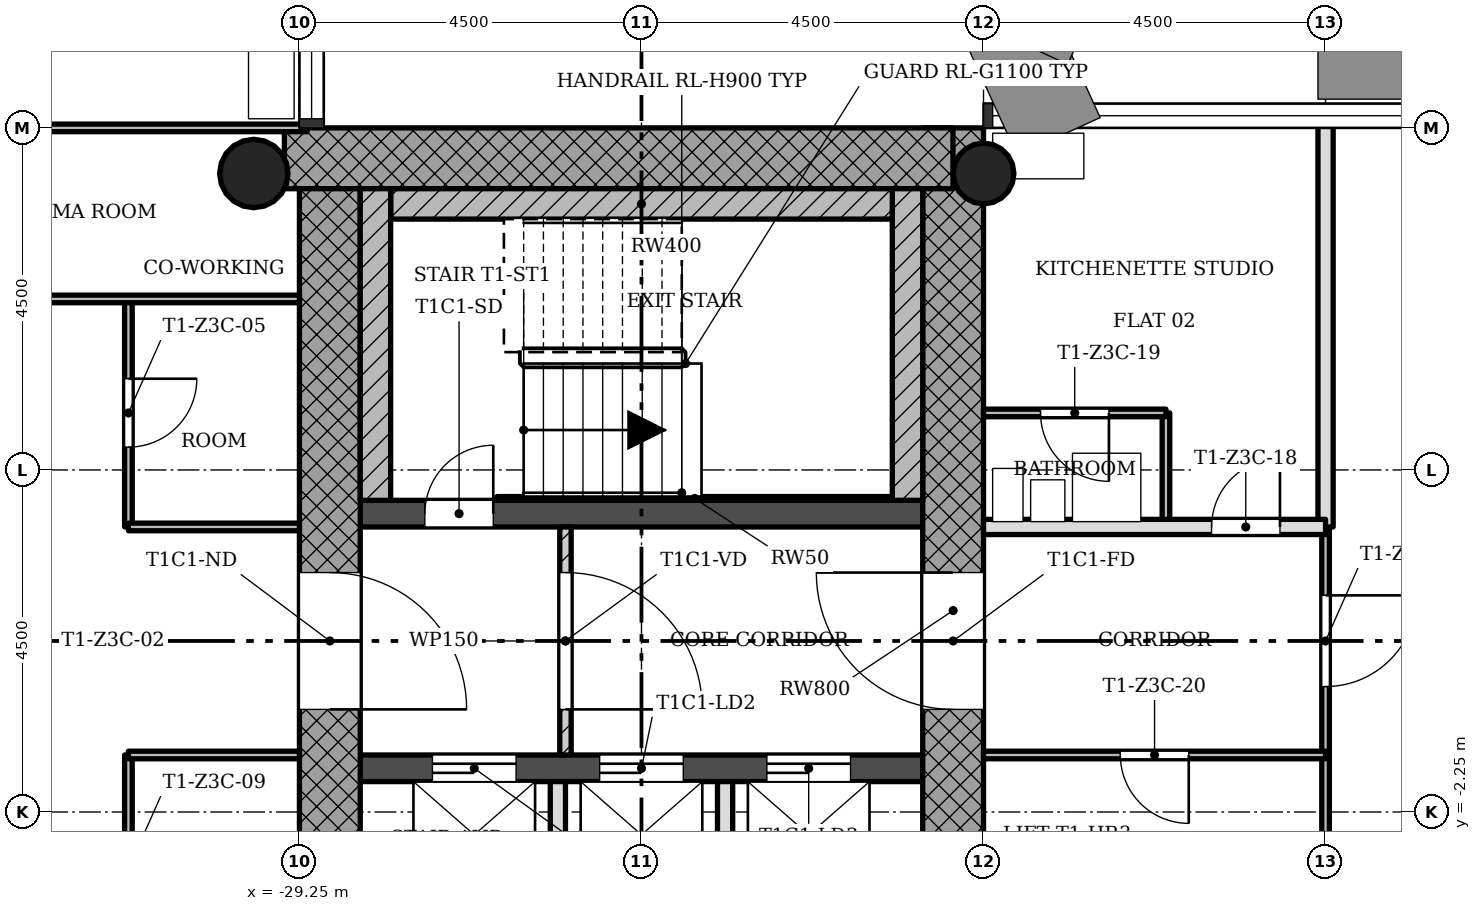
"""IFC4 building model, lengths in metres.
Left out: names, types, materials, properties, quantities, classifications, styles, units other than length and angle.
Written with IfcOpenShell. Run it as: python <this file> out.ifc"""

import sys

from ifc_helpers import new_model, si_unit, direction, frame, frame_2d, origin, origin_2d, place, context, subcontext, project, spatial, rectangle, hollow_circle, extrude, element, fill, save


model = new_model("IFC4")
c1 = context("Model", 3, precision=1e-05, world=origin(), true_north=direction((0.0, 1.0)))
c2 = subcontext(c1, "Body", "Model", "MODEL_VIEW")
j1 = project(units=[si_unit("LENGTHUNIT", "METRE"), si_unit("PLANEANGLEUNIT", "RADIAN")], contexts=[c1])
p1 = place(None, origin())
s1 = spatial("IfcSite", under=j1, at=p1, CompositionType="ELEMENT")
p2 = place(p1, origin())
s2 = spatial("IfcBuilding", under=s1, at=p2, CompositionType="ELEMENT")
p3 = place(p2, frame((0.0, 0.0, 157.5)))
s3 = spatial("IfcBuildingStorey", under=s2, at=p3, CompositionType="ELEMENT", Elevation=157.5)
p4 = place(p3, frame((-20.65, -5.95, 0.0), z_axis=(0.0, 0.0, 1.0), x_axis=(0.0, 1.0, 0.0)))
e1 = element("IfcWall", 1, at=p4, inside=s3, PredefinedType="SHEAR", context=c2, shape_type="SweptSolid", body=[
    extrude(rectangle(XDim=12.7, YDim=0.8, at=frame_2d((6.35, 0.0))), origin(), (0.0, 0.0, 1.0), 3.4),
])
p5 = place(p4, frame((5.05, 0.0, 0.0)))
e2 = element("IfcOpeningElement", 2, at=p5, cuts=e1, PredefinedType="OPENING", context=c2, shape_type="SweptSolid", body=[
    extrude(rectangle(XDim=1.8, YDim=2.1, at=frame_2d((0.9, 1.05))), frame((0.0, 0.41, 0.0), z_axis=(0.0, -1.0, 0.0), x_axis=(1.0, 0.0, 0.0)), (0.0, 0.0, 1.0), 0.82),
])
p6 = place(p3, frame((-20.652, 6.35, 0.0), z_axis=(0.0, 0.0, 1.0), x_axis=(-1.0, 0.0, 0.0)))
e3 = element("IfcWall", 3, at=p6, inside=s3, PredefinedType="SHEAR", context=c2, shape_type="SweptSolid", body=[
    extrude(rectangle(XDim=8.796, YDim=0.8, at=frame_2d((4.398, 0.0))), origin(), (0.0, 0.0, 1.0), 3.4),
])
p7 = place(p3, frame((-28.85, 5.95, 0.0), z_axis=(0.0, 0.0, 1.0), x_axis=(0.0, -1.0, 0.0)))
e4 = element("IfcWall", 4, at=p7, inside=s3, PredefinedType="SHEAR", context=c2, shape_type="SweptSolid", body=[
    extrude(rectangle(XDim=12.7, YDim=0.8, at=frame_2d((6.35, 0.0))), origin(), (0.0, 0.0, 1.0), 3.4),
])
p8 = place(p7, frame((5.05, 0.0, 0.0)))
e5 = element("IfcOpeningElement", 5, at=p8, cuts=e4, PredefinedType="OPENING", context=c2, shape_type="SweptSolid", body=[
    extrude(rectangle(XDim=1.8, YDim=2.1, at=frame_2d((0.9, 1.05))), frame((0.0, 0.41, 0.0), z_axis=(0.0, -1.0, 0.0), x_axis=(1.0, 0.0, 0.0)), (0.0, 0.0, 1.0), 0.82),
])
p9 = place(p3, frame((-28.45, -1.675, 0.0), z_axis=(0.0, 0.0, 1.0), x_axis=(1.0, 0.0, 0.0)))
e6 = element("IfcWall", 6, at=p9, inside=s3, PredefinedType="SHEAR", context=c2, shape_type="SweptSolid", body=[
    extrude(rectangle(XDim=7.4, YDim=0.35, at=frame_2d((3.7, 0.0))), origin(), (0.0, 0.0, 1.0), 3.4),
])
p10 = place(p9, frame((0.95, 0.0, 0.0)))
e7 = element("IfcOpeningElement", 7, at=p10, cuts=e6, PredefinedType="OPENING", context=c2, shape_type="SweptSolid", body=[
    extrude(rectangle(XDim=1.1, YDim=2.1, at=frame_2d((0.55, 1.05))), frame((0.0, 0.185, 0.0), z_axis=(0.0, -1.0, 0.0), x_axis=(1.0, 0.0, 0.0)), (0.0, 0.0, 1.0), 0.37),
])
p11 = place(p9, frame((3.15, 0.0, 0.0)))
e8 = element("IfcOpeningElement", 8, at=p11, cuts=e6, PredefinedType="OPENING", context=c2, shape_type="SweptSolid", body=[
    extrude(rectangle(XDim=1.1, YDim=2.1, at=frame_2d((0.55, 1.05))), frame((0.0, 0.185, 0.0), z_axis=(0.0, -1.0, 0.0), x_axis=(1.0, 0.0, 0.0)), (0.0, 0.0, 1.0), 0.37),
])
p12 = place(p9, frame((5.35, 0.0, 0.0)))
e9 = element("IfcOpeningElement", 9, at=p12, cuts=e6, PredefinedType="OPENING", context=c2, shape_type="SweptSolid", body=[
    extrude(rectangle(XDim=1.1, YDim=2.1, at=frame_2d((0.55, 1.05))), frame((0.0, 0.185, 0.0), z_axis=(0.0, -1.0, 0.0), x_axis=(1.0, 0.0, 0.0)), (0.0, 0.0, 1.0), 0.37),
])
p13 = place(p3, frame((-28.45, 1.675, 0.0), z_axis=(0.0, 0.0, 1.0), x_axis=(1.0, 0.0, 0.0)))
e10 = element("IfcWall", 10, at=p13, inside=s3, PredefinedType="SHEAR", context=c2, shape_type="SweptSolid", body=[
    extrude(rectangle(XDim=7.4, YDim=0.35, at=frame_2d((3.7, 0.0))), origin(), (0.0, 0.0, 1.0), 3.4),
])
p14 = place(p13, frame((0.85, 0.0, 0.0)))
e11 = element("IfcOpeningElement", 11, at=p14, cuts=e10, PredefinedType="OPENING", context=c2, shape_type="SweptSolid", body=[
    extrude(rectangle(XDim=0.9, YDim=2.1, at=frame_2d((0.45, 1.05))), frame((0.0, 0.185, 0.0), z_axis=(0.0, -1.0, 0.0), x_axis=(1.0, 0.0, 0.0)), (0.0, 0.0, 1.0), 0.37),
])
p15 = place(p3, frame((-20.25, 6.15, 0.0), z_axis=(0.0, 0.0, 1.0), x_axis=(1.0, 0.0, 0.0)))
e12 = element("IfcColumn", 12, at=p15, inside=s3, PredefinedType="COLUMN", context=c2, shape_type="SweptSolid", body=[
    extrude(hollow_circle(Radius=0.4, WallThickness=0.028, at=origin_2d()), origin(), (0.0, 0.0, 1.0), 3.4),
])
p16 = place(p3, frame((-29.85, 6.15, 0.0), z_axis=(0.0, 0.0, 1.0), x_axis=(1.0, 0.0, 0.0)))
e13 = element("IfcColumn", 13, at=p16, inside=s3, PredefinedType="COLUMN", context=c2, shape_type="SweptSolid", body=[
    extrude(hollow_circle(Radius=0.45, WallThickness=0.032, at=origin_2d()), origin(), (0.0, 0.0, 1.0), 3.4),
])
p17 = place(p3, frame((-25.75, -1.5, 0.0), z_axis=(0.0, 0.0, 1.0), x_axis=(0.0, 1.0, 0.0)))
e14 = element("IfcWall", 14, at=p17, inside=s3, PredefinedType="PARTITIONING", context=c2, shape_type="SweptSolid", body=[
    extrude(rectangle(XDim=3.0, YDim=0.15, at=frame_2d((1.5, 0.0))), origin(), (0.0, 0.0, 1.0), 3.0),
])
p18 = place(p17, frame((0.6, 0.0, 0.0)))
e15 = element("IfcOpeningElement", 15, at=p18, cuts=e14, PredefinedType="OPENING", context=c2, shape_type="SweptSolid", body=[
    extrude(rectangle(XDim=1.8, YDim=2.1, at=frame_2d((0.9, 1.05))), frame((0.0, 0.085, 0.0), z_axis=(0.0, -1.0, 0.0), x_axis=(1.0, 0.0, 0.0)), (0.0, 0.0, 1.0), 0.17),
])
for number, where, z_axis, x_axis in (
    (16, (-25.85, -5.95, 0.0), (0.0, 0.0, 1.0), (0.0, 1.0, 0.0)),
    (17, (-23.65, -5.95, 0.0), (0.0, 0.0, 1.0), (0.0, 1.0, 0.0)),
):
    element("IfcWall", number, at=place(p3, frame(where, z_axis=z_axis, x_axis=x_axis)), inside=s3, PredefinedType="SOLIDWALL", context=c2, shape_type="SweptSolid", body=[
        extrude(rectangle(XDim=4.1, YDim=0.2, at=frame_2d((2.05, 0.0))), origin(), (0.0, 0.0, 1.0), 3.0),
    ])
p19 = place(p3, frame((-31.5, -6.75, 0.0), z_axis=(0.0, 0.0, 1.0), x_axis=(0.0, 1.0, 0.0)))
e18 = element("IfcWall", 18, at=p19, inside=s3, PredefinedType="PARTITIONING", context=c2, shape_type="SweptSolid", body=[
    extrude(rectangle(XDim=5.25, YDim=0.1, at=frame_2d((2.625, 0.0))), origin(), (0.0, 0.0, 1.0), 3.0),
])
p20 = place(p19, frame((3.3, 0.0, 0.0)))
e19 = element("IfcOpeningElement", 19, at=p20, cuts=e18, PredefinedType="OPENING", context=c2, shape_type="SweptSolid", body=[
    extrude(rectangle(XDim=0.9, YDim=2.1, at=frame_2d((0.45, 1.05))), frame((0.0, 0.06, 0.0), z_axis=(0.0, -1.0, 0.0), x_axis=(1.0, 0.0, 0.0)), (0.0, 0.0, 1.0), 0.12),
])
p21 = place(p3, frame((-31.5, 1.5, 0.0), z_axis=(0.0, 0.0, 1.0), x_axis=(0.0, 1.0, 0.0)))
e20 = element("IfcWall", 20, at=p21, inside=s3, PredefinedType="PARTITIONING", context=c2, shape_type="SweptSolid", body=[
    extrude(rectangle(XDim=3.0, YDim=0.1, at=frame_2d((1.5, 0.0))), origin(), (0.0, 0.0, 1.0), 3.0),
])
p22 = place(p21, frame((1.05, 0.0, 0.0)))
e21 = element("IfcOpeningElement", 21, at=p22, cuts=e20, PredefinedType="OPENING", context=c2, shape_type="SweptSolid", body=[
    extrude(rectangle(XDim=0.9, YDim=2.1, at=frame_2d((0.45, 1.05))), frame((0.0, 0.06, 0.0), z_axis=(0.0, -1.0, 0.0), x_axis=(1.0, 0.0, 0.0)), (0.0, 0.0, 1.0), 0.12),
])
p23 = place(p3, frame((-17.85, 1.5, 0.0), z_axis=(0.0, 0.0, 1.0), x_axis=(0.0, 1.0, 0.0)))
e22 = element("IfcWall", 22, at=p23, inside=s3, PredefinedType="PARTITIONING", context=c2, shape_type="SweptSolid", body=[
    extrude(rectangle(XDim=1.5, YDim=0.1, at=frame_2d((0.75, 0.0))), origin(), (0.0, 0.0, 1.0), 3.0),
])
p24 = place(p3, frame((-15.75, -6.85, 0.0), z_axis=(0.0, 0.0, 1.0), x_axis=(0.0, 1.0, 0.0)))
e23 = element("IfcWall", 23, at=p24, inside=s3, PredefinedType="PARTITIONING", context=c2, shape_type="SweptSolid", body=[
    extrude(rectangle(XDim=8.35, YDim=0.1, at=frame_2d((4.175, 0.0))), origin(), (0.0, 0.0, 1.0), 3.0),
])
p25 = place(p24, frame((6.25, 0.0, 0.0)))
e24 = element("IfcOpeningElement", 24, at=p25, cuts=e23, PredefinedType="OPENING", context=c2, shape_type="SweptSolid", body=[
    extrude(rectangle(XDim=1.2, YDim=2.1, at=frame_2d((0.6, 1.05))), frame((0.0, 0.06, 0.0), z_axis=(0.0, -1.0, 0.0), x_axis=(1.0, 0.0, 0.0)), (0.0, 0.0, 1.0), 0.12),
])
p26 = place(p3, frame((-15.75, 1.5, 0.0), z_axis=(0.0, 0.0, 1.0), x_axis=(0.0, 1.0, 0.0)))
e25 = element("IfcWall", 25, at=p26, inside=s3, PredefinedType="SOLIDWALL", context=c2, shape_type="SweptSolid", body=[
    extrude(rectangle(XDim=5.35, YDim=0.2, at=frame_2d((2.675, 0.0))), origin(), (0.0, 0.0, 1.0), 3.0),
])
p27 = place(p3, frame((-31.5, -1.5, 0.0), z_axis=(0.0, 0.0, 1.0), x_axis=(1.0, 0.0, 0.0)))
e26 = element("IfcWall", 26, at=p27, inside=s3, PredefinedType="PARTITIONING", context=c2, shape_type="SweptSolid", body=[
    extrude(rectangle(XDim=2.25, YDim=0.1, at=frame_2d((1.125, 0.0))), origin(), (0.0, 0.0, 1.0), 3.0),
])
p28 = place(p3, frame((-20.25, -1.5, 0.0), z_axis=(0.0, 0.0, 1.0), x_axis=(1.0, 0.0, 0.0)))
e27 = element("IfcWall", 27, at=p28, inside=s3, PredefinedType="PARTITIONING", context=c2, shape_type="SweptSolid", body=[
    extrude(rectangle(XDim=4.5, YDim=0.1, at=frame_2d((2.25, 0.0))), origin(), (0.0, 0.0, 1.0), 3.0),
])
p29 = place(p28, frame((1.8, 0.0, 0.0)))
e28 = element("IfcOpeningElement", 28, at=p29, cuts=e27, PredefinedType="OPENING", context=c2, shape_type="SweptSolid", body=[
    extrude(rectangle(XDim=0.9, YDim=2.1, at=frame_2d((0.45, 1.05))), frame((0.0, 0.06, 0.0), z_axis=(0.0, -1.0, 0.0), x_axis=(1.0, 0.0, 0.0)), (0.0, 0.0, 1.0), 0.12),
])
p30 = place(p3, frame((-31.5, 1.5, 0.0), z_axis=(0.0, 0.0, 1.0), x_axis=(1.0, 0.0, 0.0)))
e29 = element("IfcWall", 29, at=p30, inside=s3, PredefinedType="PARTITIONING", context=c2, shape_type="SweptSolid", body=[
    extrude(rectangle(XDim=2.25, YDim=0.1, at=frame_2d((1.125, 0.0))), origin(), (0.0, 0.0, 1.0), 3.0),
])
p31 = place(p3, frame((-20.25, 1.5, 0.0), z_axis=(0.0, 0.0, 1.0), x_axis=(1.0, 0.0, 0.0)))
e30 = element("IfcWall", 30, at=p31, inside=s3, PredefinedType="SOLIDWALL", context=c2, shape_type="SweptSolid", body=[
    extrude(rectangle(XDim=4.5, YDim=0.2, at=frame_2d((2.25, 0.0))), origin(), (0.0, 0.0, 1.0), 3.0),
])
p32 = place(p31, frame((3.0, 0.0, 0.0)))
e31 = element("IfcOpeningElement", 31, at=p32, cuts=e30, PredefinedType="OPENING", context=c2, shape_type="SweptSolid", body=[
    extrude(rectangle(XDim=0.9, YDim=2.1, at=frame_2d((0.45, 1.05))), frame((0.0, 0.11, 0.0), z_axis=(0.0, -1.0, 0.0), x_axis=(1.0, 0.0, 0.0)), (0.0, 0.0, 1.0), 0.22),
])
p33 = place(p3, frame((-20.25, 3.0, 0.0), z_axis=(0.0, 0.0, 1.0), x_axis=(1.0, 0.0, 0.0)))
e32 = element("IfcWall", 32, at=p33, inside=s3, PredefinedType="PARTITIONING", context=c2, shape_type="SweptSolid", body=[
    extrude(rectangle(XDim=2.4, YDim=0.1, at=frame_2d((1.2, 0.0))), origin(), (0.0, 0.0, 1.0), 3.0),
])
p34 = place(p33, frame((0.75, 0.0, 0.0)))
e33 = element("IfcOpeningElement", 33, at=p34, cuts=e32, PredefinedType="OPENING", context=c2, shape_type="SweptSolid", body=[
    extrude(rectangle(XDim=0.9, YDim=2.1, at=frame_2d((0.45, 1.05))), frame((0.0, 0.06, 0.0), z_axis=(0.0, -1.0, 0.0), x_axis=(1.0, 0.0, 0.0)), (0.0, 0.0, 1.0), 0.12),
])
p35 = place(p3, frame((-35.1, 4.5, 0.0), z_axis=(0.0, 0.0, 1.0), x_axis=(1.0, 0.0, 0.0)))
e34 = element("IfcWall", 34, at=p35, inside=s3, PredefinedType="PARTITIONING", context=c2, shape_type="SweptSolid", body=[
    extrude(rectangle(XDim=5.85, YDim=0.1, at=frame_2d((2.925, 0.0))), origin(), (0.0, 0.0, 1.0), 3.0),
])
p36 = place(p35, frame((1.35, 0.0, 0.0)))
e35 = element("IfcOpeningElement", 35, at=p36, cuts=e34, PredefinedType="OPENING", context=c2, shape_type="SweptSolid", body=[
    extrude(rectangle(XDim=0.9, YDim=2.1, at=frame_2d((0.45, 1.05))), frame((0.0, 0.06, 0.0), z_axis=(0.0, -1.0, 0.0), x_axis=(1.0, 0.0, 0.0)), (0.0, 0.0, 1.0), 0.12),
])
p37 = place(p3, frame((-35.1, 6.75, 0.0), z_axis=(0.0, 0.0, 1.0), x_axis=(1.0, 0.0, 0.0)))
e36 = element("IfcWall", 36, at=p37, inside=s3, PredefinedType="PARTITIONING", context=c2, shape_type="SweptSolid", body=[
    extrude(rectangle(XDim=5.95, YDim=0.1, at=frame_2d((2.975, 0.0))), origin(), (0.0, 0.0, 1.0), 3.0),
])
p38 = place(p3, frame((-21.25, 1.85, 0.0), z_axis=(0.0, 0.0, 1.0), x_axis=(0.0, 1.0, 0.0)))
e37 = element("IfcWall", 37, at=p38, inside=s3, PredefinedType="SHEAR", context=c2, shape_type="SweptSolid", body=[
    extrude(rectangle(XDim=4.1, YDim=0.4, at=frame_2d((2.05, 0.0))), origin(), (0.0, 0.0, 1.0), 3.4),
])
p39 = place(p3, frame((-28.05, 5.75, 0.0), z_axis=(0.0, 0.0, 1.0), x_axis=(1.0, 0.0, 0.0)))
e38 = element("IfcWall", 38, at=p39, inside=s3, PredefinedType="SHEAR", context=c2, shape_type="SweptSolid", body=[
    extrude(rectangle(XDim=6.6, YDim=0.4, at=frame_2d((3.3, 0.0))), origin(), (0.0, 0.0, 1.0), 3.4),
])
p40 = place(p3, frame((-28.25, 1.85, 0.0), z_axis=(0.0, 0.0, 1.0), x_axis=(0.0, 1.0, 0.0)))
e39 = element("IfcWall", 39, at=p40, inside=s3, PredefinedType="SHEAR", context=c2, shape_type="SweptSolid", body=[
    extrude(rectangle(XDim=4.1, YDim=0.4, at=frame_2d((2.05, 0.0))), origin(), (0.0, 0.0, 1.0), 3.4),
])
p41 = place(p3, frame((-26.65, 1.875, 0.0), z_axis=(0.0, 0.0, 1.0), x_axis=(1.0, 0.0, 0.0)))
e40 = element("IfcWall", 40, at=p41, inside=s3, PredefinedType="SHEAR", context=c2, shape_type="SweptSolid", body=[
    extrude(rectangle(XDim=5.2, YDim=0.05, at=frame_2d((2.6, 0.0))), origin(), (0.0, 0.0, 1.0), 3.4),
])
p42 = place(p18, origin())
e41 = element("IfcDoor", 41, at=p42, inside=s3, OperationType="SINGLE_SWING_LEFT", PredefinedType="DOOR", context=c2, shape_type="SweptSolid", body=[
    extrude(rectangle(XDim=1.8, YDim=2.1, at=frame_2d((0.9, 1.05))), frame((0.0, 0.025, 0.0), z_axis=(0.0, -1.0, 0.0), x_axis=(1.0, 0.0, 0.0)), (0.0, 0.0, 1.0), 0.05),
])
fill(e15, e41)
p43 = place(p22, origin())
e42 = element("IfcDoor", 42, at=p43, inside=s3, OperationType="SINGLE_SWING_RIGHT", PredefinedType="DOOR", context=c2, shape_type="SweptSolid", body=[
    extrude(rectangle(XDim=0.9, YDim=2.1, at=frame_2d((0.45, 1.05))), frame((0.0, 0.025, 0.0), z_axis=(0.0, -1.0, 0.0), x_axis=(1.0, 0.0, 0.0)), (0.0, 0.0, 1.0), 0.05),
])
fill(e21, e42)
p44 = place(p32, origin())
e43 = element("IfcDoor", 43, at=p44, inside=s3, OperationType="SINGLE_SWING_LEFT", PredefinedType="DOOR", context=c2, shape_type="SweptSolid", body=[
    extrude(rectangle(XDim=0.9, YDim=2.1, at=frame_2d((0.45, 1.05))), frame((0.0, 0.025, 0.0), z_axis=(0.0, -1.0, 0.0), x_axis=(1.0, 0.0, 0.0)), (0.0, 0.0, 1.0), 0.05),
])
fill(e31, e43)
p45 = place(p34, origin())
e44 = element("IfcDoor", 44, at=p45, inside=s3, OperationType="SINGLE_SWING_RIGHT", PredefinedType="DOOR", context=c2, shape_type="SweptSolid", body=[
    extrude(rectangle(XDim=0.9, YDim=2.1, at=frame_2d((0.45, 1.05))), frame((0.0, 0.025, 0.0), z_axis=(0.0, -1.0, 0.0), x_axis=(1.0, 0.0, 0.0)), (0.0, 0.0, 1.0), 0.05),
])
fill(e33, e44)
p46 = place(p29, origin())
e45 = element("IfcDoor", 45, at=p46, inside=s3, OperationType="SINGLE_SWING_RIGHT", PredefinedType="DOOR", context=c2, shape_type="SweptSolid", body=[
    extrude(rectangle(XDim=0.9, YDim=2.1, at=frame_2d((0.45, 1.05))), frame((0.0, 0.025, 0.0), z_axis=(0.0, -1.0, 0.0), x_axis=(1.0, 0.0, 0.0)), (0.0, 0.0, 1.0), 0.05),
])
fill(e28, e45)
p47 = place(p25, origin())
e46 = element("IfcDoor", 46, at=p47, inside=s3, OperationType="SINGLE_SWING_RIGHT", PredefinedType="DOOR", context=c2, shape_type="SweptSolid", body=[
    extrude(rectangle(XDim=1.2, YDim=2.1, at=frame_2d((0.6, 1.05))), frame((0.0, 0.025, 0.0), z_axis=(0.0, -1.0, 0.0), x_axis=(1.0, 0.0, 0.0)), (0.0, 0.0, 1.0), 0.05),
])
fill(e24, e46)
p48 = place(p14, origin())
e47 = element("IfcDoor", 47, at=p48, inside=s3, OperationType="SINGLE_SWING_LEFT", PredefinedType="DOOR", context=c2, shape_type="SweptSolid", body=[
    extrude(rectangle(XDim=0.9, YDim=2.1, at=frame_2d((0.45, 1.05))), frame((0.0, 0.025, 0.0), z_axis=(0.0, -1.0, 0.0), x_axis=(1.0, 0.0, 0.0)), (0.0, 0.0, 1.0), 0.05),
])
fill(e11, e47)
p49 = place(p10, origin())
e48 = element("IfcDoor", 48, at=p49, inside=s3, OperationType="SLIDING_TO_LEFT", PredefinedType="DOOR", context=c2, shape_type="SweptSolid", body=[
    extrude(rectangle(XDim=1.1, YDim=2.1, at=frame_2d((0.55, 1.05))), frame((0.0, 0.025, 0.0), z_axis=(0.0, -1.0, 0.0), x_axis=(1.0, 0.0, 0.0)), (0.0, 0.0, 1.0), 0.05),
])
fill(e7, e48)
p50 = place(p11, origin())
e49 = element("IfcDoor", 49, at=p50, inside=s3, OperationType="SLIDING_TO_LEFT", PredefinedType="DOOR", context=c2, shape_type="SweptSolid", body=[
    extrude(rectangle(XDim=1.1, YDim=2.1, at=frame_2d((0.55, 1.05))), frame((0.0, 0.025, 0.0), z_axis=(0.0, -1.0, 0.0), x_axis=(1.0, 0.0, 0.0)), (0.0, 0.0, 1.0), 0.05),
])
fill(e8, e49)
p51 = place(p12, origin())
e50 = element("IfcDoor", 50, at=p51, inside=s3, OperationType="SLIDING_TO_LEFT", PredefinedType="DOOR", context=c2, shape_type="SweptSolid", body=[
    extrude(rectangle(XDim=1.1, YDim=2.1, at=frame_2d((0.55, 1.05))), frame((0.0, 0.025, 0.0), z_axis=(0.0, -1.0, 0.0), x_axis=(1.0, 0.0, 0.0)), (0.0, 0.0, 1.0), 0.05),
])
fill(e9, e50)
p52 = place(p8, origin())
e51 = element("IfcDoor", 51, at=p52, inside=s3, OperationType="SINGLE_SWING_LEFT", PredefinedType="DOOR", context=c2, shape_type="SweptSolid", body=[
    extrude(rectangle(XDim=1.8, YDim=2.1, at=frame_2d((0.9, 1.05))), frame((0.0, 0.025, 0.0), z_axis=(0.0, -1.0, 0.0), x_axis=(1.0, 0.0, 0.0)), (0.0, 0.0, 1.0), 0.05),
])
fill(e5, e51)
p53 = place(p5, origin())
e52 = element("IfcDoor", 52, at=p53, inside=s3, OperationType="SINGLE_SWING_LEFT", PredefinedType="DOOR", context=c2, shape_type="SweptSolid", body=[
    extrude(rectangle(XDim=1.8, YDim=2.1, at=frame_2d((0.9, 1.05))), frame((0.0, 0.025, 0.0), z_axis=(0.0, -1.0, 0.0), x_axis=(1.0, 0.0, 0.0)), (0.0, 0.0, 1.0), 0.05),
])
fill(e2, e52)
save(model, sys.argv[1])
